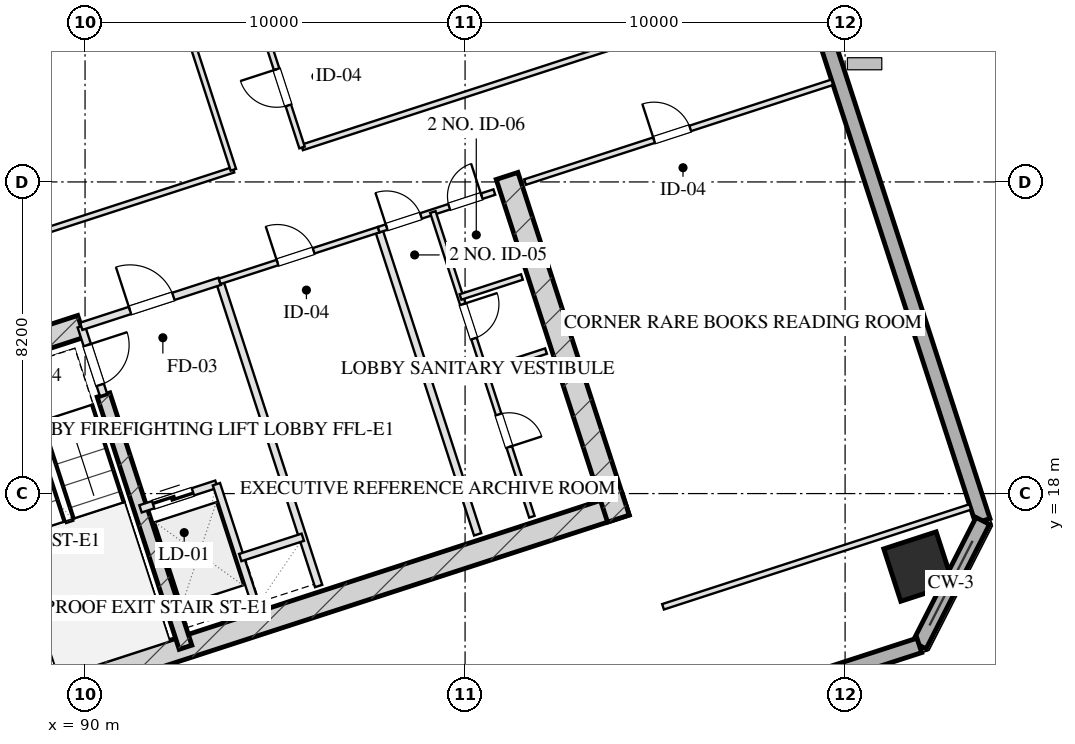
"""IFC4 building model, lengths in metres.
Left out: names, types, materials, properties, quantities, classifications, styles, units other than length and angle.
Written with IfcOpenShell. Run it as: python <this file> out.ifc"""

import sys

from ifc_helpers import new_model, si_unit, direction, frame, frame_2d, origin, origin_2d, place, context, subcontext, project, spatial, rectangle, hollow_rectangle, extrude, element, fill, save


model = new_model("IFC4")
c1 = context("Model", 3, precision=1e-05, world=origin(), true_north=direction((0.0, 1.0)))
c2 = subcontext(c1, "Body", "Model", "MODEL_VIEW")
j1 = project(units=[si_unit("LENGTHUNIT", "METRE"), si_unit("PLANEANGLEUNIT", "RADIAN")], contexts=[c1])
p1 = place(None, origin())
s1 = spatial("IfcSite", under=j1, at=p1, CompositionType="ELEMENT")
p2 = place(p1, origin())
s2 = spatial("IfcBuilding", under=s1, at=p2, CompositionType="ELEMENT")
p3 = place(p2, frame((0.0, 0.0, 100.05)))
s3 = spatial("IfcBuildingStorey", under=s2, at=p3, CompositionType="ELEMENT", Elevation=100.05)
p4 = place(p3, frame((88.63, 12.652, 0.0), z_axis=(0.0, 0.0, 1.0), x_axis=(0.95105714907, 0.309015046886, 0.0)))
e1 = element("IfcWall", 1, at=p4, inside=s3, PredefinedType="SHEAR", context=c2, shape_type="SweptSolid", body=[
    extrude(rectangle(XDim=16.4, YDim=0.6, at=frame_2d((8.2, 0.0))), origin(), (0.0, 0.0, 1.0), 3.45),
])
p5 = place(p3, frame((86.078, 21.475, 0.0), z_axis=(0.0, 0.0, 1.0), x_axis=(0.309017938678, -0.951056209472, 0.0)))
e2 = element("IfcWall", 2, at=p5, inside=s3, PredefinedType="SHEAR", context=c2, shape_type="SweptSolid", body=[
    extrude(rectangle(XDim=9.48, YDim=0.6, at=frame_2d((4.74, 0.0))), origin(), (0.0, 0.0, 1.0), 3.45),
])
p6 = place(p3, frame((101.105, 26.358, 0.0), z_axis=(0.0, 0.0, 1.0), x_axis=(0.309010370028, -0.95105866865, 0.0)))
e3 = element("IfcWall", 3, at=p6, inside=s3, PredefinedType="SHEAR", context=c2, shape_type="SweptSolid", body=[
    extrude(rectangle(XDim=9.48, YDim=0.6, at=frame_2d((4.74, 0.0))), origin(), (0.0, 0.0, 1.0), 3.45),
])
p7 = place(p3, frame((90.486, 20.594, 0.0), z_axis=(0.0, 0.0, 1.0), x_axis=(0.309020428229, -0.951055400562, 0.0)))
e4 = element("IfcWall", 4, at=p7, inside=s3, PredefinedType="SHEAR", context=c2, shape_type="SweptSolid", body=[
    extrude(rectangle(XDim=6.98, YDim=0.35, at=frame_2d((3.49, 0.0))), origin(), (0.0, 0.0, 1.0), 3.45),
])
p8 = place(p3, frame((85.886, 21.097, 0.0), z_axis=(0.0, 0.0, 1.0), x_axis=(0.951068073652, 0.308981422225, 0.0)))
e5 = element("IfcWall", 5, at=p8, inside=s3, PredefinedType="SHEAR", context=c2, shape_type="SweptSolid", body=[
    extrude(rectangle(XDim=4.22, YDim=0.6, at=frame_2d((2.11, 0.0))), origin(), (0.0, 0.0, 1.0), 3.45),
])
p9 = place(p3, frame((111.931, 16.08, 0.0), z_axis=(0.0, 0.0, 1.0), x_axis=(0.951056516295, 0.309016994375, 0.0)))
e6 = element("IfcColumn", 6, at=p9, inside=s3, PredefinedType="COLUMN", context=c2, shape_type="SweptSolid", body=[
    extrude(hollow_rectangle(XDim=1.45, YDim=1.45, WallThickness=0.05, at=origin_2d()), origin(), (0.0, 0.0, 1.0), 3.451),
])
p10 = place(p3, frame((99.284, 61.41, 0.0), z_axis=(0.0, 0.0, 1.0), x_axis=(0.309017542002, -0.95105633836, 0.0)))
e7 = element("IfcWall", 7, at=p10, inside=s3, PredefinedType="SOLIDWALL", context=c2, shape_type="SweptSolid", body=[
    extrude(rectangle(XDim=46.4, YDim=0.4, at=frame_2d((23.2, 0.0))), origin(), (0.0, 0.0, 1.0), 2.55),
])
p11 = place(p10, frame((19.55, 0.0, 0.0)))
e8 = element("IfcOpeningElement", 8, at=p11, cuts=e7, PredefinedType="OPENING", context=c2, shape_type="SweptSolid", body=[
    extrude(rectangle(XDim=1.1, YDim=2.15, at=frame_2d((0.55, 1.075))), frame((0.0, 0.21, 0.0), z_axis=(0.0, -1.0, 0.0), x_axis=(1.0, 0.0, 0.0)), (0.0, 0.0, 1.0), 0.42),
])
p12 = place(p3, frame((113.623, 17.281, 0.0), z_axis=(0.0, 0.0, 1.0), x_axis=(-0.454026238093, -0.890988313685, 0.0)))
e9 = element("IfcWall", 9, at=p12, inside=s3, PredefinedType="SOLIDWALL", context=c2, shape_type="SweptSolid", body=[
    extrude(rectangle(XDim=3.677, YDim=0.4, at=frame_2d((1.838, 0.0))), origin(), (0.0, 0.0, 1.0), 2.55),
])
p13 = place(p3, frame((111.953, 14.005, 0.0), z_axis=(0.0, 0.0, 1.0), x_axis=(-0.95105505922, -0.309021478754, 0.0)))
e10 = element("IfcWall", 10, at=p13, inside=s3, PredefinedType="SOLIDWALL", context=c2, shape_type="SweptSolid", body=[
    extrude(rectangle(XDim=29.4, YDim=0.4, at=frame_2d((14.7, 0.0))), origin(), (0.0, 0.0, 1.0), 2.55),
])
p14 = place(p3, frame((89.899, 22.401, 0.0), z_axis=(0.0, 0.0, 1.0), x_axis=(0.308932062672, -0.951084108086, 0.0)))
e11 = element("IfcWall", 11, at=p14, inside=s3, PredefinedType="PARTITIONING", context=c2, shape_type="SweptSolid", body=[
    extrude(rectangle(XDim=1.9, YDim=0.2, at=frame_2d((0.95, 0.0))), origin(), (0.0, 0.0, 1.0), 3.155),
])
p15 = place(p14, frame((0.52, 0.0, 0.0)))
e12 = element("IfcOpeningElement", 12, at=p15, cuts=e11, PredefinedType="OPENING", context=c2, shape_type="SweptSolid", body=[
    extrude(rectangle(XDim=1.1, YDim=2.05, at=frame_2d((0.55, 1.025))), frame((0.0, 0.11, 0.0), z_axis=(0.0, -1.0, 0.0), x_axis=(1.0, 0.0, 0.0)), (0.0, 0.0, 1.0), 0.22),
])
p16 = place(p3, frame((93.542, 23.585, 0.0), z_axis=(0.0, 0.0, 1.0), x_axis=(0.309042196757, -0.951048327176, 0.0)))
e13 = element("IfcWall", 13, at=p16, inside=s3, PredefinedType="PARTITIONING", context=c2, shape_type="SweptSolid", body=[
    extrude(rectangle(XDim=8.43, YDim=0.2, at=frame_2d((4.215, 0.0))), origin(), (0.0, 0.0, 1.0), 3.155),
])
p17 = place(p3, frame((89.899, 22.401, 0.0), z_axis=(0.0, 0.0, 1.0), x_axis=(0.951046716504, 0.309047153403, 0.0)))
e14 = element("IfcWall", 14, at=p17, inside=s3, PredefinedType="PARTITIONING", context=c2, shape_type="SweptSolid", body=[
    extrude(rectangle(XDim=3.83, YDim=0.2, at=frame_2d((1.915, 0.0))), origin(), (0.0, 0.0, 1.0), 3.155),
])
p18 = place(p17, frame((1.35, 0.0, 0.0)))
e15 = element("IfcOpeningElement", 15, at=p18, cuts=e14, PredefinedType="OPENING", context=c2, shape_type="SweptSolid", body=[
    extrude(rectangle(XDim=1.2, YDim=2.05, at=frame_2d((0.6, 1.025))), frame((0.0, 0.11, 0.0), z_axis=(0.0, -1.0, 0.0), x_axis=(1.0, 0.0, 0.0)), (0.0, 0.0, 1.0), 0.22),
])
p19 = place(p3, frame((91.46, 17.598, 0.0), z_axis=(0.0, 0.0, 1.0), x_axis=(0.951062257173, 0.308999325213, 0.0)))
e16 = element("IfcWall", 16, at=p19, inside=s3, PredefinedType="PARTITIONING", context=c2, shape_type="SweptSolid", body=[
    extrude(rectangle(XDim=2.1, YDim=0.2, at=frame_2d((1.05, 0.0))), origin(), (0.0, 0.0, 1.0), 3.155),
])
p20 = place(p19, frame((0.35, 0.0, 0.0)))
e17 = element("IfcOpeningElement", 17, at=p20, cuts=e16, PredefinedType="OPENING", context=c2, shape_type="SweptSolid", body=[
    extrude(rectangle(XDim=1.1, YDim=2.05, at=frame_2d((0.55, 1.025))), frame((0.0, 0.11, 0.0), z_axis=(0.0, -1.0, 0.0), x_axis=(1.0, 0.0, 0.0)), (0.0, 0.0, 1.0), 0.22),
])
p21 = place(p3, frame((93.457, 18.247, 0.0), z_axis=(0.0, 0.0, 1.0), x_axis=(0.3089935693, -0.951064127245, 0.0)))
e18 = element("IfcWall", 18, at=p21, inside=s3, PredefinedType="PARTITIONING", context=c2, shape_type="SweptSolid", body=[
    extrude(rectangle(XDim=3.7, YDim=0.2, at=frame_2d((1.85, 0.0))), origin(), (0.0, 0.0, 1.0), 3.155),
])
p22 = place(p3, frame((94.084, 16.317, 0.0), z_axis=(0.0, 0.0, 1.0), x_axis=(0.951041328149, 0.309063734775, 0.0)))
e19 = element("IfcWall", 19, at=p22, inside=s3, PredefinedType="PARTITIONING", context=c2, shape_type="SweptSolid", body=[
    extrude(rectangle(XDim=1.73, YDim=0.2, at=frame_2d((0.865, 0.0))), origin(), (0.0, 0.0, 1.0), 3.155),
])
p23 = place(p3, frame((97.727, 24.944, 0.0), z_axis=(0.0, 0.0, 1.0), x_axis=(0.309016001439, -0.951056838919, 0.0)))
e20 = element("IfcWall", 20, at=p23, inside=s3, PredefinedType="PARTITIONING", context=c2, shape_type="SweptSolid", body=[
    extrude(rectangle(XDim=8.43, YDim=0.2, at=frame_2d((4.215, 0.0))), origin(), (0.0, 0.0, 1.0), 3.155),
])
p24 = place(p3, frame((93.542, 23.585, 0.0), z_axis=(0.0, 0.0, 1.0), x_axis=(0.951063829732, 0.308994485023, 0.0)))
e21 = element("IfcWall", 21, at=p24, inside=s3, PredefinedType="PARTITIONING", context=c2, shape_type="SweptSolid", body=[
    extrude(rectangle(XDim=4.4, YDim=0.15, at=frame_2d((2.2, 0.0))), origin(), (0.0, 0.0, 1.0), 3.155),
])
p25 = place(p24, frame((1.6, 0.0, 0.0)))
e22 = element("IfcOpeningElement", 22, at=p25, cuts=e21, PredefinedType="OPENING", context=c2, shape_type="SweptSolid", body=[
    extrude(rectangle(XDim=1.0, YDim=2.05, at=frame_2d((0.5, 1.025))), frame((0.0, 0.085, 0.0), z_axis=(0.0, -1.0, 0.0), x_axis=(1.0, 0.0, 0.0)), (0.0, 0.0, 1.0), 0.17),
])
p26 = place(p3, frame((97.727, 24.944, 0.0), z_axis=(0.0, 0.0, 1.0), x_axis=(0.951036872128, 0.309077446369, 0.0)))
e23 = element("IfcWall", 23, at=p26, inside=s3, PredefinedType="PARTITIONING", context=c2, shape_type="SweptSolid", body=[
    extrude(rectangle(XDim=3.2, YDim=0.15, at=frame_2d((1.6, 0.0))), origin(), (0.0, 0.0, 1.0), 3.155),
])
p27 = place(p26, frame((0.22, 0.0, 0.0)))
e24 = element("IfcOpeningElement", 24, at=p27, cuts=e23, PredefinedType="OPENING", context=c2, shape_type="SweptSolid", body=[
    extrude(rectangle(XDim=0.95, YDim=2.05, at=frame_2d((0.475, 1.025))), frame((0.0, 0.085, 0.0), z_axis=(0.0, -1.0, 0.0), x_axis=(1.0, 0.0, 0.0)), (0.0, 0.0, 1.0), 0.17),
])
p28 = place(p26, frame((1.95, 0.0, 0.0)))
e25 = element("IfcOpeningElement", 25, at=p28, cuts=e23, PredefinedType="OPENING", context=c2, shape_type="SweptSolid", body=[
    extrude(rectangle(XDim=0.9, YDim=2.05, at=frame_2d((0.45, 1.025))), frame((0.0, 0.085, 0.0), z_axis=(0.0, -1.0, 0.0), x_axis=(1.0, 0.0, 0.0)), (0.0, 0.0, 1.0), 0.17),
])
p29 = place(p3, frame((99.153, 25.408, 0.0), z_axis=(0.0, 0.0, 1.0), x_axis=(0.309016001439, -0.951056838919, 0.0)))
e26 = element("IfcWall", 26, at=p29, inside=s3, PredefinedType="PARTITIONING", context=c2, shape_type="SweptSolid", body=[
    extrude(rectangle(XDim=8.43, YDim=0.15, at=frame_2d((4.215, 0.0))), origin(), (0.0, 0.0, 1.0), 3.155),
])
p30 = place(p29, frame((2.55, 0.0, 0.0)))
e27 = element("IfcOpeningElement", 27, at=p30, cuts=e26, PredefinedType="OPENING", context=c2, shape_type="SweptSolid", body=[
    extrude(rectangle(XDim=0.95, YDim=2.05, at=frame_2d((0.475, 1.025))), frame((0.0, 0.085, 0.0), z_axis=(0.0, -1.0, 0.0), x_axis=(1.0, 0.0, 0.0)), (0.0, 0.0, 1.0), 0.17),
])
p31 = place(p29, frame((5.6, 0.0, 0.0)))
e28 = element("IfcOpeningElement", 28, at=p31, cuts=e26, PredefinedType="OPENING", context=c2, shape_type="SweptSolid", body=[
    extrude(rectangle(XDim=0.9, YDim=2.05, at=frame_2d((0.45, 1.025))), frame((0.0, 0.085, 0.0), z_axis=(0.0, -1.0, 0.0), x_axis=(1.0, 0.0, 0.0)), (0.0, 0.0, 1.0), 0.17),
])
for number, where, z_axis, x_axis in (
    (29, (100.513, 21.223, 0.0), (0.0, 0.0, 1.0), (0.951, 0.309, 0.0)),
    (30, (99.879, 23.173, 0.0), (0.0, 0.0, 1.0), (0.951, 0.309, 0.0)),
):
    element("IfcWall", number, at=place(p3, frame(where, z_axis=z_axis, x_axis=x_axis)), inside=s3, PredefinedType="PARTITIONING", context=c2, shape_type="SweptSolid", body=[
        extrude(rectangle(XDim=1.7, YDim=0.15, at=frame_2d((0.85, 0.0))), origin(), (0.0, 0.0, 1.0), 3.155),
    ])
p32 = place(p3, frame((105.209, 15.021, 0.0), z_axis=(0.0, 0.0, 1.0), x_axis=(0.951054329824, 0.309023723562, 0.0)))
e31 = element("IfcWall", 31, at=p32, inside=s3, PredefinedType="PARTITIONING", context=c2, shape_type="SweptSolid", body=[
    extrude(rectangle(XDim=8.5, YDim=0.15, at=frame_2d((4.25, 0.0))), origin(), (0.0, 0.0, 1.0), 3.155),
])
p33 = place(p3, frame((101.578, 26.196, 0.0), z_axis=(0.0, 0.0, 1.0), x_axis=(0.951062770994, 0.308997743729, 0.0)))
e32 = element("IfcWall", 32, at=p33, inside=s3, PredefinedType="PARTITIONING", context=c2, shape_type="SweptSolid", body=[
    extrude(rectangle(XDim=8.5, YDim=0.15, at=frame_2d((4.25, 0.0))), origin(), (0.0, 0.0, 1.0), 3.155),
])
p34 = place(p33, frame((3.57, 0.0, 0.0)))
e33 = element("IfcOpeningElement", 33, at=p34, cuts=e32, PredefinedType="OPENING", context=c2, shape_type="SweptSolid", body=[
    extrude(rectangle(XDim=1.0, YDim=2.05, at=frame_2d((0.5, 1.025))), frame((0.0, 0.085, 0.0), z_axis=(0.0, -1.0, 0.0), x_axis=(1.0, 0.0, 0.0)), (0.0, 0.0, 1.0), 0.17),
])
p35 = place(p3, frame((85.676, 23.847, 0.0), z_axis=(0.0, 0.0, 1.0), x_axis=(0.951063309554, 0.308996086091, 0.0)))
e34 = element("IfcWall", 34, at=p35, inside=s3, PredefinedType="PARTITIONING", context=c2, shape_type="SweptSolid", body=[
    extrude(rectangle(XDim=8.65, YDim=0.15, at=frame_2d((4.325, 0.0))), origin(), (0.0, 0.0, 1.0), 3.155),
])
p36 = place(p3, frame((95.709, 27.107, 0.0), z_axis=(0.0, 0.0, 1.0), x_axis=(0.951056688031, 0.309016465825, 0.0)))
e35 = element("IfcWall", 35, at=p36, inside=s3, PredefinedType="PARTITIONING", context=c2, shape_type="SweptSolid", body=[
    extrude(rectangle(XDim=13.8, YDim=0.15, at=frame_2d((6.9, 0.0))), origin(), (0.0, 0.0, 1.0), 3.155),
])
p37 = place(p3, frame((93.903, 26.52, 0.0), z_axis=(0.0, 0.0, 1.0), x_axis=(-0.30901773025, 0.951056277195, 0.0)))
e36 = element("IfcWall", 36, at=p37, inside=s3, PredefinedType="PARTITIONING", context=c2, shape_type="SweptSolid", body=[
    extrude(rectangle(XDim=16.64, YDim=0.15, at=frame_2d((8.32, 0.0))), origin(), (0.0, 0.0, 1.0), 3.155),
])
p38 = place(p3, frame((95.709, 27.107, 0.0), z_axis=(0.0, 0.0, 1.0), x_axis=(-0.30901773025, 0.951056277195, 0.0)))
e37 = element("IfcWall", 37, at=p38, inside=s3, PredefinedType="PARTITIONING", context=c2, shape_type="SweptSolid", body=[
    extrude(rectangle(XDim=16.64, YDim=0.15, at=frame_2d((8.32, 0.0))), origin(), (0.0, 0.0, 1.0), 3.155),
])
p39 = place(p38, frame((1.164, 0.0, 0.0)))
e38 = element("IfcOpeningElement", 38, at=p39, cuts=e37, PredefinedType="OPENING", context=c2, shape_type="SweptSolid", body=[
    extrude(rectangle(XDim=1.0, YDim=2.05, at=frame_2d((0.5, 1.025))), frame((0.0, 0.085, 0.0), z_axis=(0.0, -1.0, 0.0), x_axis=(1.0, 0.0, 0.0)), (0.0, 0.0, 1.0), 0.17),
])
p40 = place(p38, frame((4.724, 0.0, 0.0)))
e39 = element("IfcOpeningElement", 39, at=p40, cuts=e37, PredefinedType="OPENING", context=c2, shape_type="SweptSolid", body=[
    extrude(rectangle(XDim=1.05, YDim=2.05, at=frame_2d((0.525, 1.025))), frame((0.0, 0.085, 0.0), z_axis=(0.0, -1.0, 0.0), x_axis=(1.0, 0.0, 0.0)), (0.0, 0.0, 1.0), 0.17),
])
p41 = place(p38, frame((7.82, 0.0, 0.0)))
e40 = element("IfcOpeningElement", 40, at=p41, cuts=e37, PredefinedType="OPENING", context=c2, shape_type="SweptSolid", body=[
    extrude(rectangle(XDim=1.0, YDim=2.05, at=frame_2d((0.5, 1.025))), frame((0.0, 0.085, 0.0), z_axis=(0.0, -1.0, 0.0), x_axis=(1.0, 0.0, 0.0)), (0.0, 0.0, 1.0), 0.17),
])
p42 = place(p38, frame((10.92, 0.0, 0.0)))
e41 = element("IfcOpeningElement", 41, at=p42, cuts=e37, PredefinedType="OPENING", context=c2, shape_type="SweptSolid", body=[
    extrude(rectangle(XDim=1.0, YDim=2.05, at=frame_2d((0.5, 1.025))), frame((0.0, 0.085, 0.0), z_axis=(0.0, -1.0, 0.0), x_axis=(1.0, 0.0, 0.0)), (0.0, 0.0, 1.0), 0.17),
])
p43 = place(p38, frame((14.48, 0.0, 0.0)))
e42 = element("IfcOpeningElement", 42, at=p43, cuts=e37, PredefinedType="OPENING", context=c2, shape_type="SweptSolid", body=[
    extrude(rectangle(XDim=1.0, YDim=2.05, at=frame_2d((0.5, 1.025))), frame((0.0, 0.085, 0.0), z_axis=(0.0, -1.0, 0.0), x_axis=(1.0, 0.0, 0.0)), (0.0, 0.0, 1.0), 0.17),
])
p44 = place(p15, origin())
e43 = element("IfcDoor", 43, at=p44, inside=s3, OperationType="SINGLE_SWING_LEFT", PredefinedType="DOOR", context=c2, shape_type="SweptSolid", body=[
    extrude(rectangle(XDim=1.1, YDim=2.05, at=frame_2d((0.55, 1.025))), frame((0.0, 0.025, 0.0), z_axis=(0.0, -1.0, 0.0), x_axis=(1.0, 0.0, 0.0)), (0.0, 0.0, 1.0), 0.05),
])
fill(e12, e43)
p45 = place(p18, origin())
e44 = element("IfcDoor", 44, at=p45, inside=s3, OperationType="SINGLE_SWING_LEFT", PredefinedType="DOOR", context=c2, shape_type="SweptSolid", body=[
    extrude(rectangle(XDim=1.2, YDim=2.05, at=frame_2d((0.6, 1.025))), frame((0.0, 0.025, 0.0), z_axis=(0.0, -1.0, 0.0), x_axis=(1.0, 0.0, 0.0)), (0.0, 0.0, 1.0), 0.05),
])
fill(e15, e44)
p46 = place(p20, origin())
e45 = element("IfcDoor", 45, at=p46, inside=s3, OperationType="DOUBLE_DOOR_SLIDING", PredefinedType="DOOR", context=c2, shape_type="SweptSolid", body=[
    extrude(rectangle(XDim=1.1, YDim=2.05, at=frame_2d((0.55, 1.025))), frame((0.0, 0.025, 0.0), z_axis=(0.0, -1.0, 0.0), x_axis=(1.0, 0.0, 0.0)), (0.0, 0.0, 1.0), 0.05),
])
fill(e17, e45)
p47 = place(p25, origin())
e46 = element("IfcDoor", 46, at=p47, inside=s3, OperationType="SINGLE_SWING_LEFT", PredefinedType="DOOR", context=c2, shape_type="SweptSolid", body=[
    extrude(rectangle(XDim=1.0, YDim=2.05, at=frame_2d((0.5, 1.025))), frame((0.0, 0.025, 0.0), z_axis=(0.0, -1.0, 0.0), x_axis=(1.0, 0.0, 0.0)), (0.0, 0.0, 1.0), 0.05),
])
fill(e22, e46)
p48 = place(p27, origin())
e47 = element("IfcDoor", 47, at=p48, inside=s3, OperationType="SINGLE_SWING_LEFT", PredefinedType="DOOR", context=c2, shape_type="SweptSolid", body=[
    extrude(rectangle(XDim=0.95, YDim=2.05, at=frame_2d((0.475, 1.025))), frame((0.0, 0.025, 0.0), z_axis=(0.0, -1.0, 0.0), x_axis=(1.0, 0.0, 0.0)), (0.0, 0.0, 1.0), 0.05),
])
fill(e24, e47)
p49 = place(p28, origin())
e48 = element("IfcDoor", 48, at=p49, inside=s3, OperationType="SINGLE_SWING_RIGHT", PredefinedType="DOOR", context=c2, shape_type="SweptSolid", body=[
    extrude(rectangle(XDim=0.9, YDim=2.05, at=frame_2d((0.45, 1.025))), frame((0.0, 0.025, 0.0), z_axis=(0.0, -1.0, 0.0), x_axis=(1.0, 0.0, 0.0)), (0.0, 0.0, 1.0), 0.05),
])
fill(e25, e48)
p50 = place(p30, origin())
e49 = element("IfcDoor", 49, at=p50, inside=s3, OperationType="SINGLE_SWING_LEFT", PredefinedType="DOOR", context=c2, shape_type="SweptSolid", body=[
    extrude(rectangle(XDim=0.95, YDim=2.05, at=frame_2d((0.475, 1.025))), frame((0.0, 0.025, 0.0), z_axis=(0.0, -1.0, 0.0), x_axis=(1.0, 0.0, 0.0)), (0.0, 0.0, 1.0), 0.05),
])
fill(e27, e49)
p51 = place(p31, origin())
e50 = element("IfcDoor", 50, at=p51, inside=s3, OperationType="SINGLE_SWING_RIGHT", PredefinedType="DOOR", context=c2, shape_type="SweptSolid", body=[
    extrude(rectangle(XDim=0.9, YDim=2.05, at=frame_2d((0.45, 1.025))), frame((0.0, 0.025, 0.0), z_axis=(0.0, -1.0, 0.0), x_axis=(1.0, 0.0, 0.0)), (0.0, 0.0, 1.0), 0.05),
])
fill(e28, e50)
p52 = place(p34, origin())
e51 = element("IfcDoor", 51, at=p52, inside=s3, OperationType="SINGLE_SWING_LEFT", PredefinedType="DOOR", context=c2, shape_type="SweptSolid", body=[
    extrude(rectangle(XDim=1.0, YDim=2.05, at=frame_2d((0.5, 1.025))), frame((0.0, 0.025, 0.0), z_axis=(0.0, -1.0, 0.0), x_axis=(1.0, 0.0, 0.0)), (0.0, 0.0, 1.0), 0.05),
])
fill(e33, e51)
p53 = place(p39, origin())
e52 = element("IfcDoor", 52, at=p53, inside=s3, OperationType="SINGLE_SWING_RIGHT", PredefinedType="DOOR", context=c2, shape_type="SweptSolid", body=[
    extrude(rectangle(XDim=1.0, YDim=2.05, at=frame_2d((0.5, 1.025))), frame((0.0, 0.025, 0.0), z_axis=(0.0, -1.0, 0.0), x_axis=(1.0, 0.0, 0.0)), (0.0, 0.0, 1.0), 0.05),
])
fill(e38, e52)
save(model, sys.argv[1])
